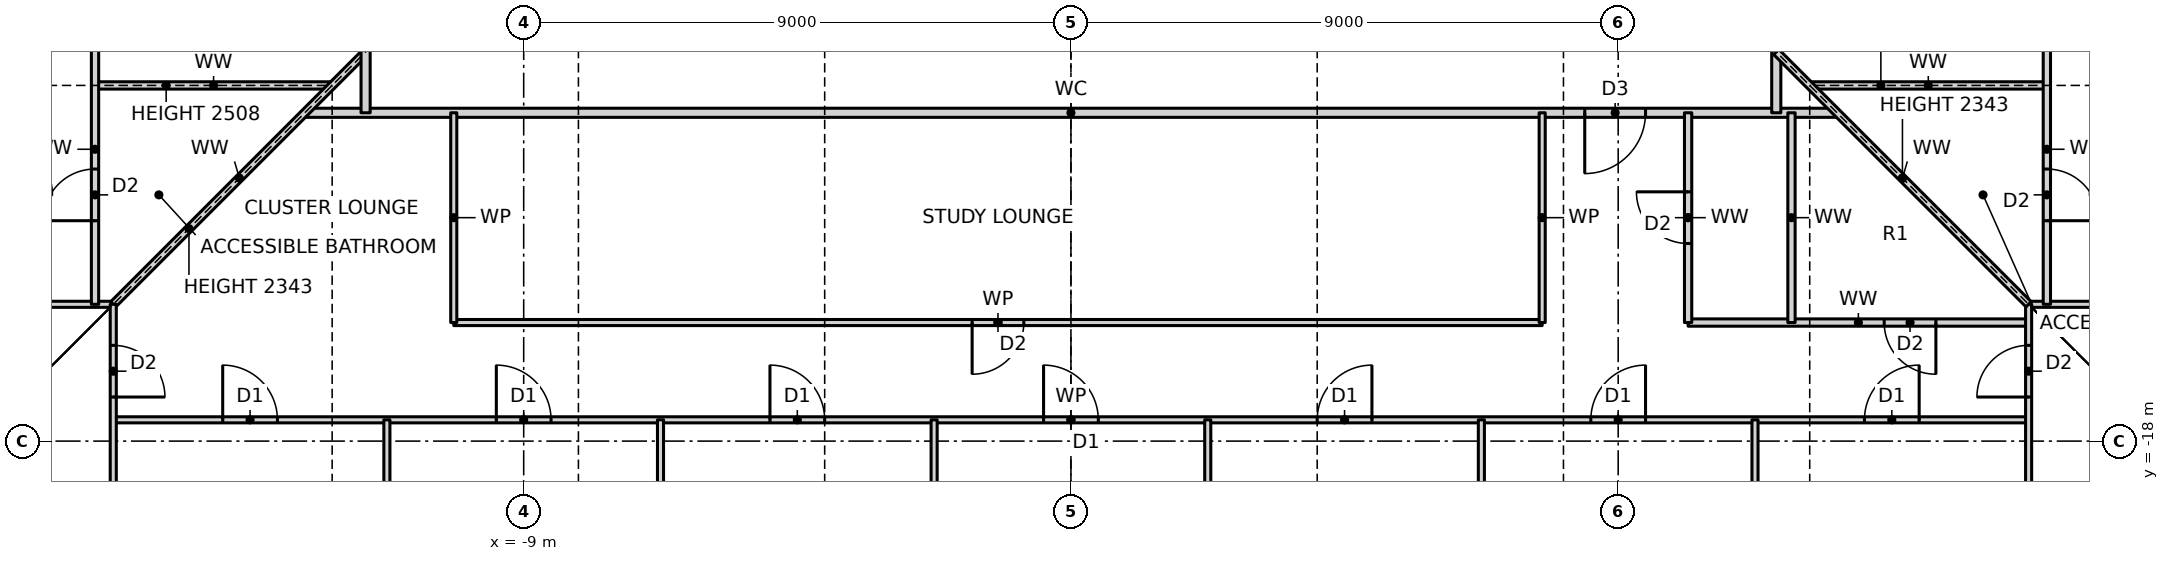
"""IFC4 building model, lengths in metres.
Left out: names, types, materials, properties, quantities, classifications, styles, units other than length and angle.
Written with IfcOpenShell. Run it as: python <this file> out.ifc"""

import sys

from ifc_helpers import new_model, si_unit, direction, frame, frame_2d, origin, place, context, subcontext, project, spatial, rectangle, extrude, element, fill, save


model = new_model("IFC4")
c1 = context("Model", 3, precision=1e-05, world=origin(), true_north=direction((0.0, 1.0)))
c2 = subcontext(c1, "Body", "Model", "MODEL_VIEW")
j1 = project(units=[si_unit("LENGTHUNIT", "METRE"), si_unit("PLANEANGLEUNIT", "RADIAN")], contexts=[c1])
p1 = place(None, origin())
s1 = spatial("IfcSite", under=j1, at=p1, CompositionType="ELEMENT")
p2 = place(p1, origin())
s2 = spatial("IfcBuilding", under=s1, at=p2, CompositionType="ELEMENT")
p3 = place(p2, frame((0.0, 0.0, 22.0)))
s3 = spatial("IfcBuildingStorey", under=s2, at=p3, CompositionType="ELEMENT", Elevation=22.0)
p4 = place(p3, frame((-15.75, -17.65, 0.0), z_axis=(0.0, 0.0, 1.0), x_axis=(1.0, 0.0, 0.0)))
e1 = element("IfcWall", 1, at=p4, inside=s3, PredefinedType="PARTITIONING", context=c2, shape_type="SweptSolid", body=[
    extrude(rectangle(XDim=31.5, YDim=0.1, at=frame_2d((15.75, 0.0))), origin(), (0.0, 0.0, 1.0), 3.27),
])
p5 = place(p4, frame((1.8, 0.0, 0.0)))
e2 = element("IfcOpeningElement", 2, at=p5, cuts=e1, PredefinedType="OPENING", context=c2, shape_type="SweptSolid", body=[
    extrude(rectangle(XDim=0.9, YDim=2.1, at=frame_2d((0.45, 1.05))), frame((0.0, 0.06, 0.0), z_axis=(0.0, -1.0, 0.0), x_axis=(1.0, 0.0, 0.0)), (0.0, 0.0, 1.0), 0.12),
])
p6 = place(p4, frame((6.3, 0.0, 0.0)))
e3 = element("IfcOpeningElement", 3, at=p6, cuts=e1, PredefinedType="OPENING", context=c2, shape_type="SweptSolid", body=[
    extrude(rectangle(XDim=0.9, YDim=2.1, at=frame_2d((0.45, 1.05))), frame((0.0, 0.06, 0.0), z_axis=(0.0, -1.0, 0.0), x_axis=(1.0, 0.0, 0.0)), (0.0, 0.0, 1.0), 0.12),
])
p7 = place(p4, frame((10.8, 0.0, 0.0)))
e4 = element("IfcOpeningElement", 4, at=p7, cuts=e1, PredefinedType="OPENING", context=c2, shape_type="SweptSolid", body=[
    extrude(rectangle(XDim=0.9, YDim=2.1, at=frame_2d((0.45, 1.05))), frame((0.0, 0.06, 0.0), z_axis=(0.0, -1.0, 0.0), x_axis=(1.0, 0.0, 0.0)), (0.0, 0.0, 1.0), 0.12),
])
p8 = place(p4, frame((15.3, 0.0, 0.0)))
e5 = element("IfcOpeningElement", 5, at=p8, cuts=e1, PredefinedType="OPENING", context=c2, shape_type="SweptSolid", body=[
    extrude(rectangle(XDim=0.9, YDim=2.1, at=frame_2d((0.45, 1.05))), frame((0.0, 0.06, 0.0), z_axis=(0.0, -1.0, 0.0), x_axis=(1.0, 0.0, 0.0)), (0.0, 0.0, 1.0), 0.12),
])
p9 = place(p4, frame((19.8, 0.0, 0.0)))
e6 = element("IfcOpeningElement", 6, at=p9, cuts=e1, PredefinedType="OPENING", context=c2, shape_type="SweptSolid", body=[
    extrude(rectangle(XDim=0.9, YDim=2.1, at=frame_2d((0.45, 1.05))), frame((0.0, 0.06, 0.0), z_axis=(0.0, -1.0, 0.0), x_axis=(1.0, 0.0, 0.0)), (0.0, 0.0, 1.0), 0.12),
])
p10 = place(p4, frame((24.3, 0.0, 0.0)))
e7 = element("IfcOpeningElement", 7, at=p10, cuts=e1, PredefinedType="OPENING", context=c2, shape_type="SweptSolid", body=[
    extrude(rectangle(XDim=0.9, YDim=2.1, at=frame_2d((0.45, 1.05))), frame((0.0, 0.06, 0.0), z_axis=(0.0, -1.0, 0.0), x_axis=(1.0, 0.0, 0.0)), (0.0, 0.0, 1.0), 0.12),
])
p11 = place(p4, frame((28.8, 0.0, 0.0)))
e8 = element("IfcOpeningElement", 8, at=p11, cuts=e1, PredefinedType="OPENING", context=c2, shape_type="SweptSolid", body=[
    extrude(rectangle(XDim=0.9, YDim=2.1, at=frame_2d((0.45, 1.05))), frame((0.0, 0.06, 0.0), z_axis=(0.0, -1.0, 0.0), x_axis=(1.0, 0.0, 0.0)), (0.0, 0.0, 1.0), 0.12),
])
p12 = place(p3, frame((-10.15, -16.05, 0.0), z_axis=(0.0, 0.0, 1.0), x_axis=(1.0, 0.0, 0.0)))
e9 = element("IfcWall", 9, at=p12, inside=s3, PredefinedType="PARTITIONING", context=c2, shape_type="SweptSolid", body=[
    extrude(rectangle(XDim=17.9, YDim=0.1, at=frame_2d((8.95, 0.0))), origin(), (0.0, 0.0, 1.0), 3.27),
])
p13 = place(p12, frame((8.525, 0.0, 0.0)))
e10 = element("IfcOpeningElement", 10, at=p13, cuts=e9, PredefinedType="OPENING", context=c2, shape_type="SweptSolid", body=[
    extrude(rectangle(XDim=0.85, YDim=2.1, at=frame_2d((0.425, 1.05))), frame((0.0, 0.06, 0.0), z_axis=(0.0, -1.0, 0.0), x_axis=(1.0, 0.0, 0.0)), (0.0, 0.0, 1.0), 0.12),
])
p14 = place(p3, frame((10.15, -16.05, 0.0), z_axis=(0.0, 0.0, 1.0), x_axis=(1.0, 0.0, 0.0)))
e11 = element("IfcWall", 11, at=p14, inside=s3, PredefinedType="PARTITIONING", context=c2, shape_type="SweptSolid", body=[
    extrude(rectangle(XDim=5.6, YDim=0.12, at=frame_2d((2.8, 0.0))), origin(), (0.0, 0.0, 1.0), 3.27),
])
p15 = place(p14, frame((3.225, 0.0, 0.0)))
e12 = element("IfcOpeningElement", 12, at=p15, cuts=e11, PredefinedType="OPENING", context=c2, shape_type="SweptSolid", body=[
    extrude(rectangle(XDim=0.85, YDim=2.1, at=frame_2d((0.425, 1.05))), frame((0.0, 0.07, 0.0), z_axis=(0.0, -1.0, 0.0), x_axis=(1.0, 0.0, 0.0)), (0.0, 0.0, 1.0), 0.14),
])
for number, where, z_axis, x_axis in (
    (13, (-23.19, -15.75, 0.0), (0.0, 0.0, 1.0), (1.0, 0.0, 0.0)),
    (14, (15.75, -15.75, 0.0), (0.0, 0.0, 1.0), (1.0, 0.0, 0.0)),
):
    element("IfcWall", number, at=place(p3, frame(where, z_axis=z_axis, x_axis=x_axis)), inside=s3, PredefinedType="PARTITIONING", context=c2, shape_type="SweptSolid", body=[
        extrude(rectangle(XDim=7.44, YDim=0.1, at=frame_2d((3.72, 0.0))), origin(), (0.0, 0.0, 1.0), 3.27),
    ])
p16 = place(p3, frame((-12.6, -12.6, 0.0), z_axis=(0.0, 0.0, 1.0), x_axis=(1.0, 0.0, 0.0)))
e15 = element("IfcWall", 15, at=p16, inside=s3, PredefinedType="PARTITIONING", context=c2, shape_type="SweptSolid", body=[
    extrude(rectangle(XDim=25.2, YDim=0.15, at=frame_2d((12.6, 0.0))), origin(), (0.0, 0.0, 1.0), 3.27),
])
p17 = place(p16, frame((21.05, 0.0, 0.0)))
e16 = element("IfcOpeningElement", 16, at=p17, cuts=e15, PredefinedType="OPENING", context=c2, shape_type="SweptSolid", body=[
    extrude(rectangle(XDim=1.0, YDim=2.1, at=frame_2d((0.5, 1.05))), frame((0.0, 0.085, 0.0), z_axis=(0.0, -1.0, 0.0), x_axis=(1.0, 0.0, 0.0)), (0.0, 0.0, 1.0), 0.17),
])
for number, where, z_axis, x_axis in (
    (17, (-16.05, -12.15, 0.0), (0.0, 0.0, 1.0), (1.0, 0.0, 0.0)),
    (18, (12.15, -12.15, 0.0), (0.0, 0.0, 1.0), (1.0, 0.0, 0.0)),
):
    element("IfcWall", number, at=place(p3, frame(where, z_axis=z_axis, x_axis=x_axis)), inside=s3, PredefinedType="PARTITIONING", context=c2, shape_type="SweptSolid", body=[
        extrude(rectangle(XDim=3.9, YDim=0.12, at=frame_2d((1.95, 0.0))), origin(), (0.0, 0.0, 1.0), 2.508),
    ])
p18 = place(p3, frame((-15.75, -15.75, 0.0), z_axis=(0.0, 0.0, 1.0), x_axis=(0.707106781187, 0.707106781187, 0.0)))
e19 = element("IfcWall", 19, at=p18, inside=s3, PredefinedType="PARTITIONING", context=c2, shape_type="SweptSolid", body=[
    extrude(rectangle(XDim=5.869, YDim=0.12, at=frame_2d((2.935, 0.0))), origin(), (0.0, 0.0, 1.0), 2.343),
])
p19 = place(p3, frame((16.05, -15.75, 0.0), z_axis=(0.0, 0.0, 1.0), x_axis=(0.0, 1.0, 0.0)))
e20 = element("IfcWall", 20, at=p19, inside=s3, PredefinedType="PARTITIONING", context=c2, shape_type="SweptSolid", body=[
    extrude(rectangle(XDim=5.1, YDim=0.12, at=frame_2d((2.55, 0.0))), origin(), (0.0, 0.0, 1.0), 3.27),
])
p20 = place(p19, frame((1.375, 0.0, 0.0)))
e21 = element("IfcOpeningElement", 21, at=p20, cuts=e20, PredefinedType="OPENING", context=c2, shape_type="SweptSolid", body=[
    extrude(rectangle(XDim=0.85, YDim=2.1, at=frame_2d((0.425, 1.05))), frame((0.0, 0.07, 0.0), z_axis=(0.0, -1.0, 0.0), x_axis=(1.0, 0.0, 0.0)), (0.0, 0.0, 1.0), 0.14),
])
p21 = place(p3, frame((15.75, -23.19, 0.0), z_axis=(0.0, 0.0, 1.0), x_axis=(0.0, 1.0, 0.0)))
e22 = element("IfcWall", 22, at=p21, inside=s3, PredefinedType="PARTITIONING", context=c2, shape_type="SweptSolid", body=[
    extrude(rectangle(XDim=7.44, YDim=0.1, at=frame_2d((3.72, 0.0))), origin(), (0.0, 0.0, 1.0), 3.27),
])
p22 = place(p21, frame((5.915, 0.0, 0.0)))
e23 = element("IfcOpeningElement", 23, at=p22, cuts=e22, PredefinedType="OPENING", context=c2, shape_type="SweptSolid", body=[
    extrude(rectangle(XDim=0.85, YDim=2.1, at=frame_2d((0.425, 1.05))), frame((0.0, 0.06, 0.0), z_axis=(0.0, -1.0, 0.0), x_axis=(1.0, 0.0, 0.0)), (0.0, 0.0, 1.0), 0.12),
])
p23 = place(p3, frame((11.85, -16.05, 0.0), z_axis=(0.0, 0.0, 1.0), x_axis=(0.0, 1.0, 0.0)))
e24 = element("IfcWall", 24, at=p23, inside=s3, PredefinedType="PARTITIONING", context=c2, shape_type="SweptSolid", body=[
    extrude(rectangle(XDim=3.45, YDim=0.12, at=frame_2d((1.725, 0.0))), origin(), (0.0, 0.0, 1.0), 3.27),
])
p24 = place(p3, frame((11.6, -12.6, 0.0), z_axis=(0.0, 0.0, 1.0), x_axis=(0.0, 1.0, 0.0)))
e25 = element("IfcWall", 25, at=p24, inside=s3, PredefinedType="PARTITIONING", context=c2, shape_type="SweptSolid", body=[
    extrude(rectangle(XDim=24.2, YDim=0.15, at=frame_2d((12.1, 0.0))), origin(), (0.0, 0.0, 1.0), 3.27),
])
p25 = place(p24, frame((7.0, 0.0, 0.0)))
e26 = element("IfcOpeningElement", 26, at=p25, cuts=e25, PredefinedType="OPENING", context=c2, shape_type="SweptSolid", body=[
    extrude(rectangle(XDim=1.0, YDim=2.1, at=frame_2d((0.5, 1.05))), frame((0.0, 0.085, 0.0), z_axis=(0.0, -1.0, 0.0), x_axis=(1.0, 0.0, 0.0)), (0.0, 0.0, 1.0), 0.17),
])
p26 = place(p24, frame((4.8, 0.0, 0.0)))
e27 = element("IfcOpeningElement", 27, at=p26, cuts=e25, PredefinedType="OPENING", context=c2, shape_type="SweptSolid", body=[
    extrude(rectangle(XDim=0.9, YDim=2.1, at=frame_2d((0.45, 1.05))), frame((0.0, 0.085, 0.0), z_axis=(0.0, -1.0, 0.0), x_axis=(1.0, 0.0, 0.0)), (0.0, 0.0, 1.0), 0.17),
])
p27 = place(p3, frame((11.25, -23.19, 0.0), z_axis=(0.0, 0.0, 1.0), x_axis=(0.0, 1.0, 0.0)))
e28 = element("IfcWall", 28, at=p27, inside=s3, PredefinedType="PARTITIONING", context=c2, shape_type="SweptSolid", body=[
    extrude(rectangle(XDim=5.54, YDim=0.1, at=frame_2d((2.77, 0.0))), origin(), (0.0, 0.0, 1.0), 3.27),
])
p28 = place(p3, frame((10.15, -16.05, 0.0), z_axis=(0.0, 0.0, 1.0), x_axis=(0.0, 1.0, 0.0)))
e29 = element("IfcWall", 29, at=p28, inside=s3, PredefinedType="PARTITIONING", context=c2, shape_type="SweptSolid", body=[
    extrude(rectangle(XDim=3.45, YDim=0.12, at=frame_2d((1.725, 0.0))), origin(), (0.0, 0.0, 1.0), 3.27),
])
p29 = place(p28, frame((1.3, 0.0, 0.0)))
e30 = element("IfcOpeningElement", 30, at=p29, cuts=e29, PredefinedType="OPENING", context=c2, shape_type="SweptSolid", body=[
    extrude(rectangle(XDim=0.85, YDim=2.1, at=frame_2d((0.425, 1.05))), frame((0.0, 0.07, 0.0), z_axis=(0.0, -1.0, 0.0), x_axis=(1.0, 0.0, 0.0)), (0.0, 0.0, 1.0), 0.14),
])
p30 = place(p3, frame((7.75, -16.05, 0.0), z_axis=(0.0, 0.0, 1.0), x_axis=(0.0, 1.0, 0.0)))
e31 = element("IfcWall", 31, at=p30, inside=s3, PredefinedType="PARTITIONING", context=c2, shape_type="SweptSolid", body=[
    extrude(rectangle(XDim=3.45, YDim=0.1, at=frame_2d((1.725, 0.0))), origin(), (0.0, 0.0, 1.0), 3.27),
])
for number, where, z_axis, x_axis in (
    (32, (6.75, -23.19, 0.0), (0.0, 0.0, 1.0), (0.0, 1.0, 0.0)),
    (33, (2.25, -23.19, 0.0), (0.0, 0.0, 1.0), (0.0, 1.0, 0.0)),
    (34, (-2.25, -23.19, 0.0), (0.0, 0.0, 1.0), (0.0, 1.0, 0.0)),
    (35, (-6.75, -23.19, 0.0), (0.0, 0.0, 1.0), (0.0, 1.0, 0.0)),
):
    element("IfcWall", number, at=place(p3, frame(where, z_axis=z_axis, x_axis=x_axis)), inside=s3, PredefinedType="PARTITIONING", context=c2, shape_type="SweptSolid", body=[
        extrude(rectangle(XDim=5.54, YDim=0.1, at=frame_2d((2.77, 0.0))), origin(), (0.0, 0.0, 1.0), 3.27),
    ])
p31 = place(p3, frame((-10.15, -16.05, 0.0), z_axis=(0.0, 0.0, 1.0), x_axis=(0.0, 1.0, 0.0)))
e36 = element("IfcWall", 36, at=p31, inside=s3, PredefinedType="PARTITIONING", context=c2, shape_type="SweptSolid", body=[
    extrude(rectangle(XDim=3.45, YDim=0.1, at=frame_2d((1.725, 0.0))), origin(), (0.0, 0.0, 1.0), 3.27),
])
p32 = place(p3, frame((-11.25, -23.19, 0.0), z_axis=(0.0, 0.0, 1.0), x_axis=(0.0, 1.0, 0.0)))
e37 = element("IfcWall", 37, at=p32, inside=s3, PredefinedType="PARTITIONING", context=c2, shape_type="SweptSolid", body=[
    extrude(rectangle(XDim=5.54, YDim=0.1, at=frame_2d((2.77, 0.0))), origin(), (0.0, 0.0, 1.0), 3.27),
])
p33 = place(p3, frame((-11.6, -12.6, 0.0), z_axis=(0.0, 0.0, 1.0), x_axis=(0.0, 1.0, 0.0)))
e38 = element("IfcWall", 38, at=p33, inside=s3, PredefinedType="PARTITIONING", context=c2, shape_type="SweptSolid", body=[
    extrude(rectangle(XDim=24.2, YDim=0.15, at=frame_2d((12.1, 0.0))), origin(), (0.0, 0.0, 1.0), 3.27),
])
p34 = place(p33, frame((2.65, 0.0, 0.0)))
e39 = element("IfcOpeningElement", 39, at=p34, cuts=e38, PredefinedType="OPENING", context=c2, shape_type="SweptSolid", body=[
    extrude(rectangle(XDim=1.0, YDim=2.1, at=frame_2d((0.5, 1.05))), frame((0.0, 0.085, 0.0), z_axis=(0.0, -1.0, 0.0), x_axis=(1.0, 0.0, 0.0)), (0.0, 0.0, 1.0), 0.17),
])
p35 = place(p3, frame((-15.75, -23.19, 0.0), z_axis=(0.0, 0.0, 1.0), x_axis=(0.0, 1.0, 0.0)))
e40 = element("IfcWall", 40, at=p35, inside=s3, PredefinedType="PARTITIONING", context=c2, shape_type="SweptSolid", body=[
    extrude(rectangle(XDim=7.44, YDim=0.1, at=frame_2d((3.72, 0.0))), origin(), (0.0, 0.0, 1.0), 3.27),
])
p36 = place(p35, frame((5.915, 0.0, 0.0)))
e41 = element("IfcOpeningElement", 41, at=p36, cuts=e40, PredefinedType="OPENING", context=c2, shape_type="SweptSolid", body=[
    extrude(rectangle(XDim=0.85, YDim=2.1, at=frame_2d((0.425, 1.05))), frame((0.0, 0.06, 0.0), z_axis=(0.0, -1.0, 0.0), x_axis=(1.0, 0.0, 0.0)), (0.0, 0.0, 1.0), 0.12),
])
p37 = place(p3, frame((-16.05, -15.75, 0.0), z_axis=(0.0, 0.0, 1.0), x_axis=(0.0, 1.0, 0.0)))
e42 = element("IfcWall", 42, at=p37, inside=s3, PredefinedType="PARTITIONING", context=c2, shape_type="SweptSolid", body=[
    extrude(rectangle(XDim=5.1, YDim=0.12, at=frame_2d((2.55, 0.0))), origin(), (0.0, 0.0, 1.0), 3.27),
])
p38 = place(p37, frame((1.375, 0.0, 0.0)))
e43 = element("IfcOpeningElement", 43, at=p38, cuts=e42, PredefinedType="OPENING", context=c2, shape_type="SweptSolid", body=[
    extrude(rectangle(XDim=0.85, YDim=2.1, at=frame_2d((0.425, 1.05))), frame((0.0, 0.07, 0.0), z_axis=(0.0, -1.0, 0.0), x_axis=(1.0, 0.0, 0.0)), (0.0, 0.0, 1.0), 0.14),
])
p39 = place(p3, frame((15.75, -15.75, 0.0), z_axis=(0.0, 0.0, 1.0), x_axis=(-0.707106781187, 0.707106781187, 0.0)))
e44 = element("IfcWall", 44, at=p39, inside=s3, PredefinedType="PARTITIONING", context=c2, shape_type="SweptSolid", body=[
    extrude(rectangle(XDim=5.869, YDim=0.12, at=frame_2d((2.935, 0.0))), origin(), (0.0, 0.0, 1.0), 2.343),
])
p40 = place(p5, origin())
e45 = element("IfcDoor", 45, at=p40, inside=s3, OperationType="SINGLE_SWING_LEFT", PredefinedType="DOOR", context=c2, shape_type="SweptSolid", body=[
    extrude(rectangle(XDim=0.9, YDim=2.1, at=frame_2d((0.45, 1.05))), frame((0.0, 0.025, 0.0), z_axis=(0.0, -1.0, 0.0), x_axis=(1.0, 0.0, 0.0)), (0.0, 0.0, 1.0), 0.05),
])
fill(e2, e45)
p41 = place(p6, origin())
e46 = element("IfcDoor", 46, at=p41, inside=s3, OperationType="SINGLE_SWING_LEFT", PredefinedType="DOOR", context=c2, shape_type="SweptSolid", body=[
    extrude(rectangle(XDim=0.9, YDim=2.1, at=frame_2d((0.45, 1.05))), frame((0.0, 0.025, 0.0), z_axis=(0.0, -1.0, 0.0), x_axis=(1.0, 0.0, 0.0)), (0.0, 0.0, 1.0), 0.05),
])
fill(e3, e46)
p42 = place(p7, origin())
e47 = element("IfcDoor", 47, at=p42, inside=s3, OperationType="SINGLE_SWING_LEFT", PredefinedType="DOOR", context=c2, shape_type="SweptSolid", body=[
    extrude(rectangle(XDim=0.9, YDim=2.1, at=frame_2d((0.45, 1.05))), frame((0.0, 0.025, 0.0), z_axis=(0.0, -1.0, 0.0), x_axis=(1.0, 0.0, 0.0)), (0.0, 0.0, 1.0), 0.05),
])
fill(e4, e47)
p43 = place(p8, origin())
e48 = element("IfcDoor", 48, at=p43, inside=s3, OperationType="SINGLE_SWING_LEFT", PredefinedType="DOOR", context=c2, shape_type="SweptSolid", body=[
    extrude(rectangle(XDim=0.9, YDim=2.1, at=frame_2d((0.45, 1.05))), frame((0.0, 0.025, 0.0), z_axis=(0.0, -1.0, 0.0), x_axis=(1.0, 0.0, 0.0)), (0.0, 0.0, 1.0), 0.05),
])
fill(e5, e48)
p44 = place(p9, origin())
e49 = element("IfcDoor", 49, at=p44, inside=s3, OperationType="SINGLE_SWING_RIGHT", PredefinedType="DOOR", context=c2, shape_type="SweptSolid", body=[
    extrude(rectangle(XDim=0.9, YDim=2.1, at=frame_2d((0.45, 1.05))), frame((0.0, 0.025, 0.0), z_axis=(0.0, -1.0, 0.0), x_axis=(1.0, 0.0, 0.0)), (0.0, 0.0, 1.0), 0.05),
])
fill(e6, e49)
p45 = place(p10, origin())
e50 = element("IfcDoor", 50, at=p45, inside=s3, OperationType="SINGLE_SWING_RIGHT", PredefinedType="DOOR", context=c2, shape_type="SweptSolid", body=[
    extrude(rectangle(XDim=0.9, YDim=2.1, at=frame_2d((0.45, 1.05))), frame((0.0, 0.025, 0.0), z_axis=(0.0, -1.0, 0.0), x_axis=(1.0, 0.0, 0.0)), (0.0, 0.0, 1.0), 0.05),
])
fill(e7, e50)
p46 = place(p11, origin())
e51 = element("IfcDoor", 51, at=p46, inside=s3, OperationType="SINGLE_SWING_RIGHT", PredefinedType="DOOR", context=c2, shape_type="SweptSolid", body=[
    extrude(rectangle(XDim=0.9, YDim=2.1, at=frame_2d((0.45, 1.05))), frame((0.0, 0.025, 0.0), z_axis=(0.0, -1.0, 0.0), x_axis=(1.0, 0.0, 0.0)), (0.0, 0.0, 1.0), 0.05),
])
fill(e8, e51)
p47 = place(p17, frame((1.0, 0.0, 0.0), z_axis=(0.0, 0.0, 1.0), x_axis=(-1.0, 0.0, 0.0)))
e52 = element("IfcDoor", 52, at=p47, inside=s3, OperationType="SINGLE_SWING_RIGHT", PredefinedType="DOOR", context=c2, shape_type="SweptSolid", body=[
    extrude(rectangle(XDim=1.0, YDim=2.1, at=frame_2d((0.5, 1.05))), frame((0.0, 0.025, 0.0), z_axis=(0.0, -1.0, 0.0), x_axis=(1.0, 0.0, 0.0)), (0.0, 0.0, 1.0), 0.05),
])
fill(e16, e52)
p48 = place(p13, frame((0.85, 0.0, 0.0), z_axis=(0.0, 0.0, 1.0), x_axis=(-1.0, 0.0, 0.0)))
e53 = element("IfcDoor", 53, at=p48, inside=s3, OperationType="SINGLE_SWING_RIGHT", PredefinedType="DOOR", context=c2, shape_type="SweptSolid", body=[
    extrude(rectangle(XDim=0.85, YDim=2.1, at=frame_2d((0.425, 1.05))), frame((0.0, 0.025, 0.0), z_axis=(0.0, -1.0, 0.0), x_axis=(1.0, 0.0, 0.0)), (0.0, 0.0, 1.0), 0.05),
])
fill(e10, e53)
p49 = place(p29, origin())
e54 = element("IfcDoor", 54, at=p49, inside=s3, OperationType="SINGLE_SWING_RIGHT", PredefinedType="DOOR", context=c2, shape_type="SweptSolid", body=[
    extrude(rectangle(XDim=0.85, YDim=2.1, at=frame_2d((0.425, 1.05))), frame((0.0, 0.025, 0.0), z_axis=(0.0, -1.0, 0.0), x_axis=(1.0, 0.0, 0.0)), (0.0, 0.0, 1.0), 0.05),
])
fill(e30, e54)
p50 = place(p15, frame((0.85, 0.0, 0.0), z_axis=(0.0, 0.0, 1.0), x_axis=(-1.0, 0.0, 0.0)))
e55 = element("IfcDoor", 55, at=p50, inside=s3, OperationType="SINGLE_SWING_LEFT", PredefinedType="DOOR", context=c2, shape_type="SweptSolid", body=[
    extrude(rectangle(XDim=0.85, YDim=2.1, at=frame_2d((0.425, 1.05))), frame((0.0, 0.025, 0.0), z_axis=(0.0, -1.0, 0.0), x_axis=(1.0, 0.0, 0.0)), (0.0, 0.0, 1.0), 0.05),
])
fill(e12, e55)
p51 = place(p20, frame((0.85, 0.0, 0.0), z_axis=(0.0, 0.0, 1.0), x_axis=(-1.0, 0.0, 0.0)))
e56 = element("IfcDoor", 56, at=p51, inside=s3, OperationType="SINGLE_SWING_RIGHT", PredefinedType="DOOR", context=c2, shape_type="SweptSolid", body=[
    extrude(rectangle(XDim=0.85, YDim=2.1, at=frame_2d((0.425, 1.05))), frame((0.0, 0.025, 0.0), z_axis=(0.0, -1.0, 0.0), x_axis=(1.0, 0.0, 0.0)), (0.0, 0.0, 1.0), 0.05),
])
fill(e21, e56)
p52 = place(p38, origin())
e57 = element("IfcDoor", 57, at=p52, inside=s3, OperationType="SINGLE_SWING_LEFT", PredefinedType="DOOR", context=c2, shape_type="SweptSolid", body=[
    extrude(rectangle(XDim=0.85, YDim=2.1, at=frame_2d((0.425, 1.05))), frame((0.0, 0.025, 0.0), z_axis=(0.0, -1.0, 0.0), x_axis=(1.0, 0.0, 0.0)), (0.0, 0.0, 1.0), 0.05),
])
fill(e43, e57)
p53 = place(p36, frame((0.85, 0.0, 0.0), z_axis=(0.0, 0.0, 1.0), x_axis=(-1.0, 0.0, 0.0)))
e58 = element("IfcDoor", 58, at=p53, inside=s3, OperationType="SINGLE_SWING_RIGHT", PredefinedType="DOOR", context=c2, shape_type="SweptSolid", body=[
    extrude(rectangle(XDim=0.85, YDim=2.1, at=frame_2d((0.425, 1.05))), frame((0.0, 0.025, 0.0), z_axis=(0.0, -1.0, 0.0), x_axis=(1.0, 0.0, 0.0)), (0.0, 0.0, 1.0), 0.05),
])
fill(e41, e58)
p54 = place(p22, origin())
e59 = element("IfcDoor", 59, at=p54, inside=s3, OperationType="SINGLE_SWING_LEFT", PredefinedType="DOOR", context=c2, shape_type="SweptSolid", body=[
    extrude(rectangle(XDim=0.85, YDim=2.1, at=frame_2d((0.425, 1.05))), frame((0.0, 0.025, 0.0), z_axis=(0.0, -1.0, 0.0), x_axis=(1.0, 0.0, 0.0)), (0.0, 0.0, 1.0), 0.05),
])
fill(e23, e59)
save(model, sys.argv[1])
